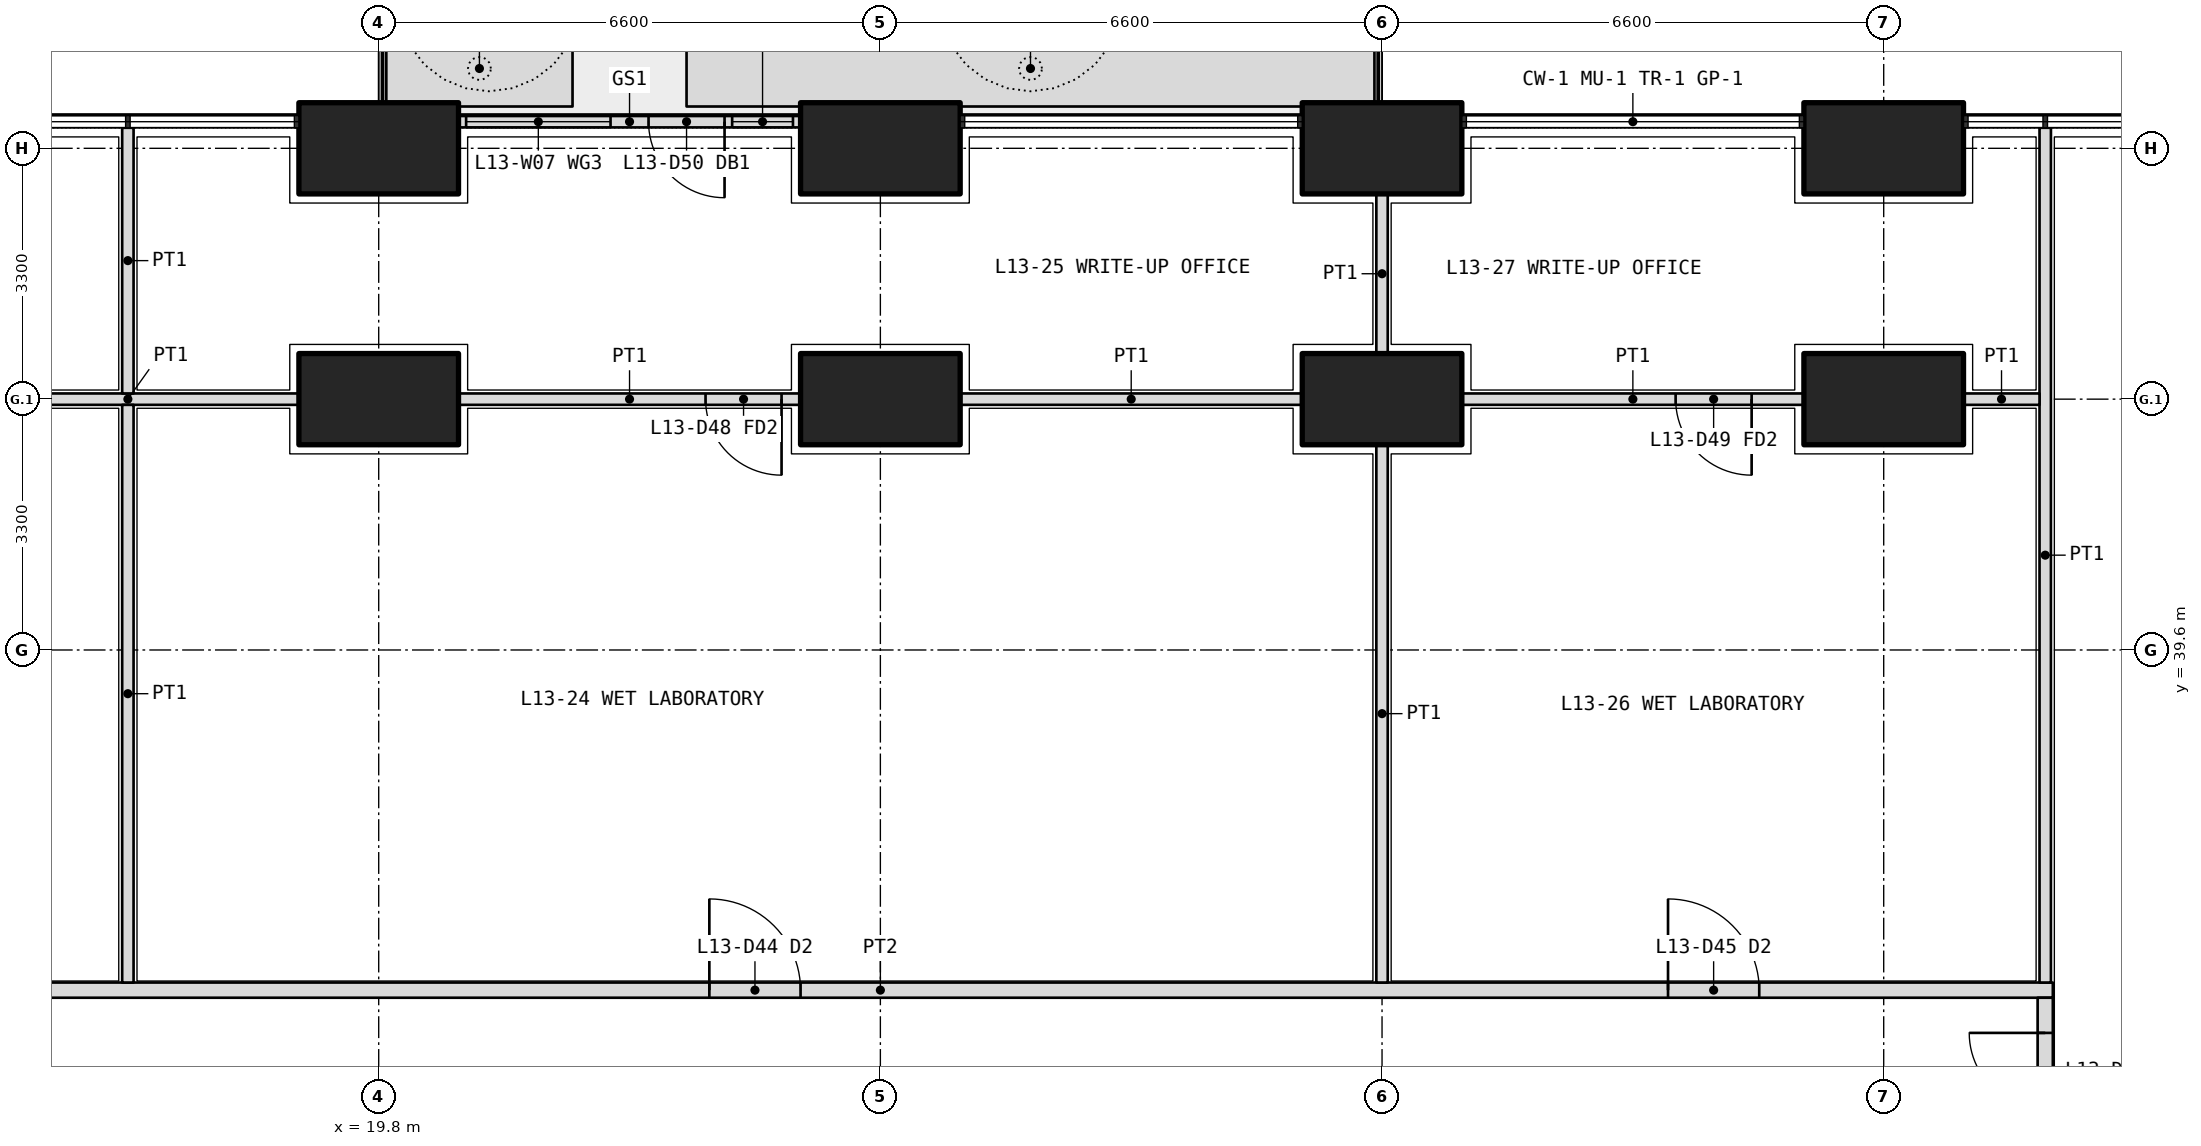
"""IFC4 building model, lengths in metres.
Left out: names, types, materials, properties, quantities, classifications, styles, units other than length and angle.
Written with IfcOpenShell. Run it as: python <this file> out.ifc"""

import sys

from ifc_helpers import new_model, si_unit, direction, frame, frame_2d, origin, origin_2d, place, context, subcontext, project, spatial, polyline, rectangle, outline, extrude, element, fill, save


model = new_model("IFC4")
c1 = context("Model", 3, precision=1e-05, world=origin(), true_north=direction((0.0, 1.0)))
c2 = subcontext(c1, "Body", "Model", "MODEL_VIEW")
j1 = project(units=[si_unit("LENGTHUNIT", "METRE"), si_unit("PLANEANGLEUNIT", "RADIAN")], contexts=[c1])
p1 = place(None, origin())
s1 = spatial("IfcSite", under=j1, at=p1, CompositionType="ELEMENT")
p2 = place(p1, origin())
s2 = spatial("IfcBuilding", under=s1, at=p2, CompositionType="ELEMENT")
p3 = place(p2, frame((0.0, 0.0, 59.1)))
s3 = spatial("IfcBuildingStorey", under=s2, at=p3, CompositionType="ELEMENT", Elevation=59.1)
for number, where, z_axis, x_axis in (
    (1, (19.8, 46.2, 0.0), (0.0, 0.0, 1.0), (1.0, 0.0, 0.0)),
    (2, (26.4, 46.2, 0.0), (0.0, 0.0, 1.0), (1.0, 0.0, 0.0)),
    (3, (33.0, 46.2, 0.0), (0.0, 0.0, 1.0), (1.0, 0.0, 0.0)),
    (4, (39.6, 46.2, 0.0), (0.0, 0.0, 1.0), (1.0, 0.0, 0.0)),
    (5, (19.8, 42.9, 0.0), (0.0, 0.0, 1.0), (1.0, 0.0, 0.0)),
    (6, (26.4, 42.9, 0.0), (0.0, 0.0, 1.0), (1.0, 0.0, 0.0)),
    (7, (33.0, 42.9, 0.0), (0.0, 0.0, 1.0), (1.0, 0.0, 0.0)),
    (8, (39.6, 42.9, 0.0), (0.0, 0.0, 1.0), (1.0, 0.0, 0.0)),
):
    element("IfcColumn", number, at=place(p3, frame(where, z_axis=z_axis, x_axis=x_axis)), inside=s3, PredefinedType="COLUMN", context=c2, shape_type="SweptSolid", body=[
        extrude(rectangle(XDim=2.1, YDim=1.2, at=origin_2d()), origin(), (0.0, 0.0, 1.0), 4.2),
    ])
p4 = place(p3, origin())
e9 = element("IfcWall", 9, at=p4, inside=s3, PredefinedType="USERDEFINED", context=c2, shape_type="SweptSolid", body=[
    extrude(outline(polyline([(19.9, 46.75), (22.35, 46.75), (22.35, 47.75), (19.9, 47.75), (19.9, 46.75)]), holes=[polyline([(20.05, 46.9), (22.2, 46.9), (22.2, 47.6), (20.05, 47.6), (20.05, 46.9)])]), origin(), (0.0, 0.0, 1.0), 1.05),
])
p5 = place(p3, origin())
e10 = element("IfcWall", 10, at=p5, inside=s3, PredefinedType="USERDEFINED", context=c2, shape_type="SweptSolid", body=[
    extrude(outline(polyline([(23.85, 46.75), (32.9, 46.75), (32.9, 47.75), (23.85, 47.75), (23.85, 46.75)]), holes=[polyline([(24.0, 46.9), (32.75, 46.9), (32.75, 47.6), (24.0, 47.6), (24.0, 46.9)])]), origin(), (0.0, 0.0, 1.0), 1.05),
])
p6 = place(p3, frame((25.35, 46.55, 0.0), z_axis=(0.0, 0.0, 1.0), x_axis=(-1.0, 0.0, 0.0)))
e11 = element("IfcWall", 11, at=p6, inside=s3, PredefinedType="SOLIDWALL", context=c2, shape_type="SweptSolid", body=[
    extrude(rectangle(XDim=4.5, YDim=0.15, at=frame_2d((2.25, 0.0))), origin(), (0.0, 0.0, 1.0), 2.7),
])
p7 = place(p6, frame((1.0, 0.0, 0.0)))
e12 = element("IfcOpeningElement", 12, at=p7, cuts=e11, PredefinedType="OPENING", context=c2, shape_type="SweptSolid", body=[
    extrude(rectangle(XDim=1.0, YDim=2.4, at=frame_2d((0.5, 1.2))), frame((0.0, 0.085, 0.0), z_axis=(0.0, -1.0, 0.0), x_axis=(1.0, 0.0, 0.0)), (0.0, 0.0, 1.0), 0.17),
])
p8 = place(p6, frame((0.1, 0.0, 0.1)))
e13 = element("IfcOpeningElement", 13, at=p8, cuts=e11, PredefinedType="OPENING", context=c2, shape_type="SweptSolid", body=[
    extrude(rectangle(XDim=0.8, YDim=2.3, at=frame_2d((0.4, 1.15))), frame((0.0, 0.085, 0.0), z_axis=(0.0, -1.0, 0.0), x_axis=(1.0, 0.0, 0.0)), (0.0, 0.0, 1.0), 0.17),
])
p9 = place(p6, frame((2.5, 0.0, 0.1)))
e14 = element("IfcOpeningElement", 14, at=p9, cuts=e11, PredefinedType="OPENING", context=c2, shape_type="SweptSolid", body=[
    extrude(rectangle(XDim=1.9, YDim=2.3, at=frame_2d((0.95, 1.15))), frame((0.0, 0.085, 0.0), z_axis=(0.0, -1.0, 0.0), x_axis=(1.0, 0.0, 0.0)), (0.0, 0.0, 1.0), 0.17),
])
p10 = place(p3, frame((10.975, 35.125, 0.0), z_axis=(0.0, 0.0, 1.0), x_axis=(1.0, 0.0, 0.0)))
e15 = element("IfcWall", 15, at=p10, inside=s3, PredefinedType="PARTITIONING", context=c2, shape_type="SweptSolid", body=[
    extrude(rectangle(XDim=30.85, YDim=0.2, at=frame_2d((15.425, 0.0))), origin(), (0.0, 0.0, 1.0), 2.85),
])
p11 = place(p10, frame((2.312, 0.0, 0.0)))
e16 = element("IfcOpeningElement", 16, at=p11, cuts=e15, PredefinedType="OPENING", context=c2, shape_type="SweptSolid", body=[
    extrude(rectangle(XDim=1.0, YDim=2.1, at=frame_2d((0.5, 1.05))), frame((0.0, 0.11, 0.0), z_axis=(0.0, -1.0, 0.0), x_axis=(1.0, 0.0, 0.0)), (0.0, 0.0, 1.0), 0.22),
])
p12 = place(p10, frame((13.175, 0.0, 0.0)))
e17 = element("IfcOpeningElement", 17, at=p12, cuts=e15, PredefinedType="OPENING", context=c2, shape_type="SweptSolid", body=[
    extrude(rectangle(XDim=1.2, YDim=2.1, at=frame_2d((0.6, 1.05))), frame((0.0, 0.11, 0.0), z_axis=(0.0, -1.0, 0.0), x_axis=(1.0, 0.0, 0.0)), (0.0, 0.0, 1.0), 0.22),
])
p13 = place(p10, frame((25.788, 0.0, 0.0)))
e18 = element("IfcOpeningElement", 18, at=p13, cuts=e15, PredefinedType="OPENING", context=c2, shape_type="SweptSolid", body=[
    extrude(rectangle(XDim=1.2, YDim=2.1, at=frame_2d((0.6, 1.05))), frame((0.0, 0.11, 0.0), z_axis=(0.0, -1.0, 0.0), x_axis=(1.0, 0.0, 0.0)), (0.0, 0.0, 1.0), 0.22),
])
p14 = place(p3, frame((41.725, 19.8, 0.0), z_axis=(0.0, 0.0, 1.0), x_axis=(0.0, 1.0, 0.0)))
e19 = element("IfcWall", 19, at=p14, inside=s3, PredefinedType="PARTITIONING", context=c2, shape_type="SweptSolid", body=[
    extrude(rectangle(XDim=15.225, YDim=0.2, at=frame_2d((7.612, 0.0))), origin(), (0.0, 0.0, 1.0), 2.85),
])
p15 = place(p14, frame((1.1, 0.0, 0.0)))
e20 = element("IfcOpeningElement", 20, at=p15, cuts=e19, PredefinedType="OPENING", context=c2, shape_type="SweptSolid", body=[
    extrude(rectangle(XDim=1.0, YDim=2.1, at=frame_2d((0.5, 1.05))), frame((0.0, 0.11, 0.0), z_axis=(0.0, -1.0, 0.0), x_axis=(1.0, 0.0, 0.0)), (0.0, 0.0, 1.0), 0.22),
])
p16 = place(p14, frame((4.45, 0.0, 0.0)))
e21 = element("IfcOpeningElement", 21, at=p16, cuts=e19, PredefinedType="OPENING", context=c2, shape_type="SweptSolid", body=[
    extrude(rectangle(XDim=0.9, YDim=2.1, at=frame_2d((0.45, 1.05))), frame((0.0, 0.11, 0.0), z_axis=(0.0, -1.0, 0.0), x_axis=(1.0, 0.0, 0.0)), (0.0, 0.0, 1.0), 0.22),
])
p17 = place(p14, frame((9.3, 0.0, 0.0)))
e22 = element("IfcOpeningElement", 22, at=p17, cuts=e19, PredefinedType="OPENING", context=c2, shape_type="SweptSolid", body=[
    extrude(rectangle(XDim=1.2, YDim=2.1, at=frame_2d((0.6, 1.05))), frame((0.0, 0.11, 0.0), z_axis=(0.0, -1.0, 0.0), x_axis=(1.0, 0.0, 0.0)), (0.0, 0.0, 1.0), 0.22),
])
p18 = place(p14, frame((13.762, 0.0, 0.0)))
e23 = element("IfcOpeningElement", 23, at=p18, cuts=e19, PredefinedType="OPENING", context=c2, shape_type="SweptSolid", body=[
    extrude(rectangle(XDim=1.0, YDim=2.1, at=frame_2d((0.5, 1.05))), frame((0.0, 0.11, 0.0), z_axis=(0.0, -1.0, 0.0), x_axis=(1.0, 0.0, 0.0)), (0.0, 0.0, 1.0), 0.22),
])
p19 = place(p3, frame((41.725, 46.47, 0.0), z_axis=(0.0, 0.0, 1.0), x_axis=(0.0, -1.0, 0.0)))
e24 = element("IfcWall", 24, at=p19, inside=s3, PredefinedType="PARTITIONING", context=c2, shape_type="SweptSolid", body=[
    extrude(rectangle(XDim=11.245, YDim=0.15, at=frame_2d((5.623, 0.0))), origin(), (0.0, 0.0, 1.0), 2.7),
])
p20 = place(p3, frame((41.65, 42.9, 0.0), z_axis=(0.0, 0.0, 1.0), x_axis=(-1.0, 0.0, 0.0)))
e25 = element("IfcWall", 25, at=p20, inside=s3, PredefinedType="PARTITIONING", context=c2, shape_type="SweptSolid", body=[
    extrude(rectangle(XDim=1.0, YDim=0.15, at=frame_2d((0.5, 0.0))), origin(), (0.0, 0.0, 1.0), 3.9),
])
p21 = place(p3, frame((38.55, 42.9, 0.0), z_axis=(0.0, 0.0, 1.0), x_axis=(-1.0, 0.0, 0.0)))
e26 = element("IfcWall", 26, at=p21, inside=s3, PredefinedType="PARTITIONING", context=c2, shape_type="SweptSolid", body=[
    extrude(rectangle(XDim=4.5, YDim=0.15, at=frame_2d((2.25, 0.0))), origin(), (0.0, 0.0, 1.0), 3.9),
])
p22 = place(p21, frame((0.688, 0.0, 0.0)))
e27 = element("IfcOpeningElement", 27, at=p22, cuts=e26, PredefinedType="OPENING", context=c2, shape_type="SweptSolid", body=[
    extrude(rectangle(XDim=1.0, YDim=2.1, at=frame_2d((0.5, 1.05))), frame((0.0, 0.085, 0.0), z_axis=(0.0, -1.0, 0.0), x_axis=(1.0, 0.0, 0.0)), (0.0, 0.0, 1.0), 0.17),
])
p23 = place(p3, frame((31.95, 42.9, 0.0), z_axis=(0.0, 0.0, 1.0), x_axis=(-1.0, 0.0, 0.0)))
e28 = element("IfcWall", 28, at=p23, inside=s3, PredefinedType="PARTITIONING", context=c2, shape_type="SweptSolid", body=[
    extrude(rectangle(XDim=4.5, YDim=0.15, at=frame_2d((2.25, 0.0))), origin(), (0.0, 0.0, 1.0), 3.9),
])
p24 = place(p3, frame((25.35, 42.9, 0.0), z_axis=(0.0, 0.0, 1.0), x_axis=(-1.0, 0.0, 0.0)))
e29 = element("IfcWall", 29, at=p24, inside=s3, PredefinedType="PARTITIONING", context=c2, shape_type="SweptSolid", body=[
    extrude(rectangle(XDim=4.5, YDim=0.15, at=frame_2d((2.25, 0.0))), origin(), (0.0, 0.0, 1.0), 3.9),
])
p25 = place(p24, frame((0.25, 0.0, 0.0)))
e30 = element("IfcOpeningElement", 30, at=p25, cuts=e29, PredefinedType="OPENING", context=c2, shape_type="SweptSolid", body=[
    extrude(rectangle(XDim=1.0, YDim=2.1, at=frame_2d((0.5, 1.05))), frame((0.0, 0.085, 0.0), z_axis=(0.0, -1.0, 0.0), x_axis=(1.0, 0.0, 0.0)), (0.0, 0.0, 1.0), 0.17),
])
p26 = place(p3, frame((18.75, 42.9, 0.0), z_axis=(0.0, 0.0, 1.0), x_axis=(-1.0, 0.0, 0.0)))
e31 = element("IfcWall", 31, at=p26, inside=s3, PredefinedType="PARTITIONING", context=c2, shape_type="SweptSolid", body=[
    extrude(rectangle(XDim=4.5, YDim=0.15, at=frame_2d((2.25, 0.0))), origin(), (0.0, 0.0, 1.0), 3.9),
])
p27 = place(p3, frame((16.5, 46.47, 0.0), z_axis=(0.0, 0.0, 1.0), x_axis=(0.0, -1.0, 0.0)))
e32 = element("IfcWall", 32, at=p27, inside=s3, PredefinedType="PARTITIONING", context=c2, shape_type="SweptSolid", body=[
    extrude(rectangle(XDim=3.495, YDim=0.15, at=frame_2d((1.748, 0.0))), origin(), (0.0, 0.0, 1.0), 2.7),
])
p28 = place(p3, frame((16.5, 42.825, 0.0), z_axis=(0.0, 0.0, 1.0), x_axis=(0.0, -1.0, 0.0)))
e33 = element("IfcWall", 33, at=p28, inside=s3, PredefinedType="PARTITIONING", context=c2, shape_type="SweptSolid", body=[
    extrude(rectangle(XDim=7.6, YDim=0.15, at=frame_2d((3.8, 0.0))), origin(), (0.0, 0.0, 1.0), 3.9),
])
p29 = place(p3, frame((33.0, 45.6, 0.0), z_axis=(0.0, 0.0, 1.0), x_axis=(0.0, -1.0, 0.0)))
e34 = element("IfcWall", 34, at=p29, inside=s3, PredefinedType="PARTITIONING", context=c2, shape_type="SweptSolid", body=[
    extrude(rectangle(XDim=2.1, YDim=0.15, at=frame_2d((1.05, 0.0))), origin(), (0.0, 0.0, 1.0), 2.85),
])
p30 = place(p3, frame((33.0, 42.3, 0.0), z_axis=(0.0, 0.0, 1.0), x_axis=(0.0, -1.0, 0.0)))
e35 = element("IfcWall", 35, at=p30, inside=s3, PredefinedType="PARTITIONING", context=c2, shape_type="SweptSolid", body=[
    extrude(rectangle(XDim=7.075, YDim=0.15, at=frame_2d((3.538, 0.0))), origin(), (0.0, 0.0, 1.0), 2.85),
])
p31 = place(p7, origin())
e36 = element("IfcDoor", 36, at=p31, inside=s3, OperationType="SINGLE_SWING_LEFT", PredefinedType="DOOR", context=c2, shape_type="SweptSolid", body=[
    extrude(rectangle(XDim=1.0, YDim=2.4, at=frame_2d((0.5, 1.2))), frame((0.0, 0.025, 0.0), z_axis=(0.0, -1.0, 0.0), x_axis=(1.0, 0.0, 0.0)), (0.0, 0.0, 1.0), 0.05),
])
fill(e12, e36)
p32 = place(p8, origin())
e37 = element("IfcWindow", 37, at=p32, inside=s3, PartitioningType="SINGLE_PANEL", PredefinedType="WINDOW", context=c2, shape_type="SweptSolid", body=[
    extrude(rectangle(XDim=0.8, YDim=2.3, at=frame_2d((0.4, 1.15))), frame((0.0, 0.03, 0.0), z_axis=(0.0, -1.0, 0.0), x_axis=(1.0, 0.0, 0.0)), (0.0, 0.0, 1.0), 0.06),
])
fill(e13, e37)
p33 = place(p9, origin())
e38 = element("IfcWindow", 38, at=p33, inside=s3, PartitioningType="SINGLE_PANEL", PredefinedType="WINDOW", context=c2, shape_type="SweptSolid", body=[
    extrude(rectangle(XDim=1.9, YDim=2.3, at=frame_2d((0.95, 1.15))), frame((0.0, 0.03, 0.0), z_axis=(0.0, -1.0, 0.0), x_axis=(1.0, 0.0, 0.0)), (0.0, 0.0, 1.0), 0.06),
])
fill(e14, e38)
p34 = place(p18, origin())
e39 = element("IfcDoor", 39, at=p34, inside=s3, OperationType="SINGLE_SWING_RIGHT", PredefinedType="DOOR", context=c2, shape_type="SweptSolid", body=[
    extrude(rectangle(XDim=1.0, YDim=2.1, at=frame_2d((0.5, 1.05))), frame((0.0, 0.025, 0.0), z_axis=(0.0, -1.0, 0.0), x_axis=(1.0, 0.0, 0.0)), (0.0, 0.0, 1.0), 0.05),
])
fill(e23, e39)
p35 = place(p12, origin())
e40 = element("IfcDoor", 40, at=p35, inside=s3, OperationType="DOUBLE_DOOR_SINGLE_SWING", PredefinedType="DOOR", context=c2, shape_type="SweptSolid", body=[
    extrude(rectangle(XDim=1.2, YDim=2.1, at=frame_2d((0.6, 1.05))), frame((0.0, 0.025, 0.0), z_axis=(0.0, -1.0, 0.0), x_axis=(1.0, 0.0, 0.0)), (0.0, 0.0, 1.0), 0.05),
])
fill(e17, e40)
p36 = place(p25, origin())
e41 = element("IfcDoor", 41, at=p36, inside=s3, OperationType="SINGLE_SWING_LEFT", PredefinedType="DOOR", context=c2, shape_type="SweptSolid", body=[
    extrude(rectangle(XDim=1.0, YDim=2.1, at=frame_2d((0.5, 1.05))), frame((0.0, 0.025, 0.0), z_axis=(0.0, -1.0, 0.0), x_axis=(1.0, 0.0, 0.0)), (0.0, 0.0, 1.0), 0.05),
])
fill(e30, e41)
p37 = place(p13, origin())
e42 = element("IfcDoor", 42, at=p37, inside=s3, OperationType="DOUBLE_DOOR_SINGLE_SWING", PredefinedType="DOOR", context=c2, shape_type="SweptSolid", body=[
    extrude(rectangle(XDim=1.2, YDim=2.1, at=frame_2d((0.6, 1.05))), frame((0.0, 0.025, 0.0), z_axis=(0.0, -1.0, 0.0), x_axis=(1.0, 0.0, 0.0)), (0.0, 0.0, 1.0), 0.05),
])
fill(e18, e42)
p38 = place(p22, origin())
e43 = element("IfcDoor", 43, at=p38, inside=s3, OperationType="SINGLE_SWING_LEFT", PredefinedType="DOOR", context=c2, shape_type="SweptSolid", body=[
    extrude(rectangle(XDim=1.0, YDim=2.1, at=frame_2d((0.5, 1.05))), frame((0.0, 0.025, 0.0), z_axis=(0.0, -1.0, 0.0), x_axis=(1.0, 0.0, 0.0)), (0.0, 0.0, 1.0), 0.05),
])
fill(e27, e43)
save(model, sys.argv[1])
